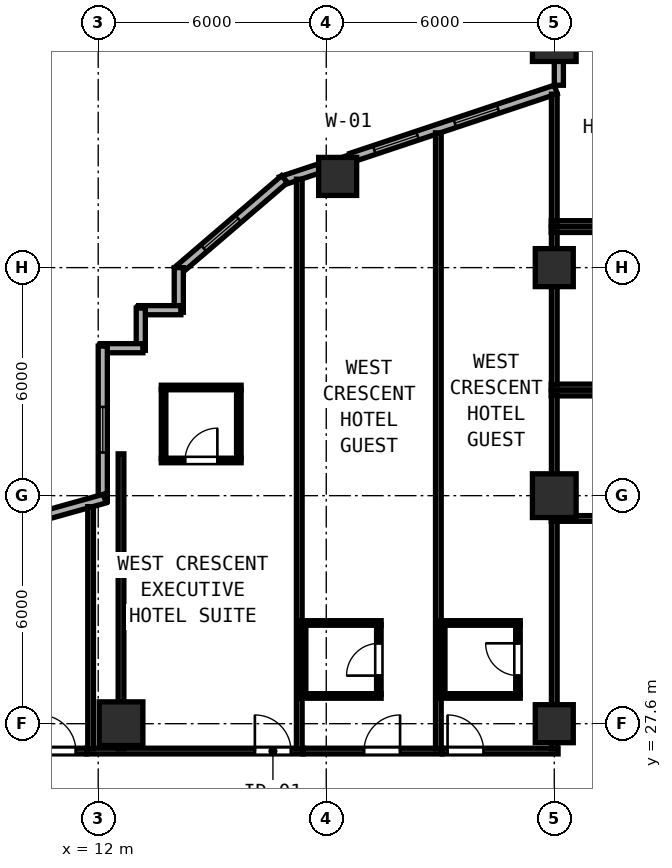
"""IFC4 building model, lengths in metres.
Left out: names, types, materials, properties, quantities, classifications, styles, units other than length and angle.
Written with IfcOpenShell. Run it as: python <this file> out.ifc"""

import sys

from ifc_helpers import new_model, si_unit, direction, frame, frame_2d, origin, origin_2d, place, context, subcontext, project, spatial, rectangle, hollow_rectangle, extrude, element, fill, save


model = new_model("IFC4")
c1 = context("Model", 3, precision=1e-05, world=origin(), true_north=direction((0.0, 1.0)))
c2 = subcontext(c1, "Body", "Model", "MODEL_VIEW")
j1 = project(units=[si_unit("LENGTHUNIT", "METRE"), si_unit("PLANEANGLEUNIT", "RADIAN")], contexts=[c1])
p1 = place(None, origin())
s1 = spatial("IfcSite", under=j1, at=p1, CompositionType="ELEMENT")
p2 = place(p1, origin())
s2 = spatial("IfcBuilding", under=s1, at=p2, CompositionType="ELEMENT")
p3 = place(p2, frame((0.0, 0.0, 70.4)))
s3 = spatial("IfcBuildingStorey", under=s2, at=p3, CompositionType="ELEMENT", Elevation=70.4)
for number, where, z_axis, x_axis in (
    (1, (24.0, 33.6, 0.0), (0.0, 0.0, 1.0), (1.0, 0.0, 0.0)),
    (2, (24.0, 45.6, 0.0), (0.0, 0.0, 1.0), (1.0, 0.0, 0.0)),
    (3, (12.6, 27.6, 0.0), (0.0, 0.0, 1.0), (1.0, 0.0, 0.0)),
):
    element("IfcColumn", number, at=place(p3, frame(where, z_axis=z_axis, x_axis=x_axis)), inside=s3, PredefinedType="COLUMN", context=c2, shape_type="SweptSolid", body=[
        extrude(hollow_rectangle(XDim=1.15, YDim=1.15, WallThickness=0.042, at=origin_2d()), origin(), (0.0, 0.0, 1.0), 3.8),
    ])
for number, where, z_axis, x_axis in (
    (4, (24.0, 27.6, 0.0), (0.0, 0.0, 1.0), (1.0, 0.0, 0.0)),
    (5, (24.0, 39.6, 0.0), (0.0, 0.0, 1.0), (1.0, 0.0, 0.0)),
    (6, (18.3, 42.0, 0.0), (0.0, 0.0, 1.0), (1.0, 0.0, 0.0)),
):
    element("IfcColumn", number, at=place(p3, frame(where, z_axis=z_axis, x_axis=x_axis)), inside=s3, PredefinedType="COLUMN", context=c2, shape_type="SweptSolid", body=[
        extrude(hollow_rectangle(XDim=1.0, YDim=1.0, WallThickness=0.038, at=origin_2d()), origin(), (0.0, 0.0, 1.0), 3.8),
    ])
p4 = place(p3, frame((24.12, 45.033, 0.0), z_axis=(0.0, 0.0, 1.0), x_axis=(0.0, -1.0, 0.0)))
e7 = element("IfcWall", 7, at=p4, inside=s3, PredefinedType="SOLIDWALL", context=c2, shape_type="SweptSolid", body=[
    extrude(rectangle(XDim=0.635, YDim=0.24, at=frame_2d((0.317, 0.0))), origin(), (0.0, 0.0, 1.0), 3.097),
])
p5 = place(p3, frame((24.039, 44.287, 0.0), z_axis=(0.0, 0.0, 1.0), x_axis=(-0.948678995954, -0.316240672014, 0.0)))
e8 = element("IfcWall", 8, at=p5, inside=s3, PredefinedType="SOLIDWALL", context=c2, shape_type="SweptSolid", body=[
    extrude(rectangle(XDim=5.675, YDim=0.24, at=frame_2d((2.837, 0.0))), origin(), (0.0, 0.0, 1.0), 3.097),
])
p6 = place(p5, frame((1.6, 0.0, 0.85)))
e9 = element("IfcOpeningElement", 9, at=p6, cuts=e8, PredefinedType="OPENING", context=c2, shape_type="SweptSolid", body=[
    extrude(rectangle(XDim=1.2, YDim=1.85, at=frame_2d((0.6, 0.925))), frame((0.0, 0.13, 0.0), z_axis=(0.0, -1.0, 0.0), x_axis=(1.0, 0.0, 0.0)), (0.0, 0.0, 1.0), 0.26),
])
p7 = place(p5, frame((3.834, 0.0, 0.85)))
e10 = element("IfcOpeningElement", 10, at=p7, cuts=e8, PredefinedType="OPENING", context=c2, shape_type="SweptSolid", body=[
    extrude(rectangle(XDim=1.2, YDim=1.85, at=frame_2d((0.6, 0.925))), frame((0.0, 0.13, 0.0), z_axis=(0.0, -1.0, 0.0), x_axis=(1.0, 0.0, 0.0)), (0.0, 0.0, 1.0), 0.26),
])
p8 = place(p3, frame((17.808, 42.209, 0.0), z_axis=(0.0, 0.0, 1.0), x_axis=(-0.948706457285, -0.316158279832, 0.0)))
e11 = element("IfcWall", 11, at=p8, inside=s3, PredefinedType="SOLIDWALL", context=c2, shape_type="SweptSolid", body=[
    extrude(rectangle(XDim=1.054, YDim=0.24, at=frame_2d((0.527, 0.0))), origin(), (0.0, 0.0, 1.0), 3.6),
])
p9 = place(p3, frame((16.902, 41.929, 0.0), z_axis=(0.0, 0.0, 1.0), x_axis=(-0.759275136126, -0.650769750112, 0.0)))
e12 = element("IfcWall", 12, at=p9, inside=s3, PredefinedType="SOLIDWALL", context=c2, shape_type="SweptSolid", body=[
    extrude(rectangle(XDim=3.719, YDim=0.24, at=frame_2d((1.86, 0.0))), origin(), (0.0, 0.0, 1.0), 3.6),
])
p10 = place(p9, frame((1.6, 0.0, 0.85)))
e13 = element("IfcOpeningElement", 13, at=p10, cuts=e12, PredefinedType="OPENING", context=c2, shape_type="SweptSolid", body=[
    extrude(rectangle(XDim=1.2, YDim=1.85, at=frame_2d((0.6, 0.925))), frame((0.0, 0.13, 0.0), z_axis=(0.0, -1.0, 0.0), x_axis=(1.0, 0.0, 0.0)), (0.0, 0.0, 1.0), 0.26),
])
p11 = place(p3, frame((14.12, 39.6, 0.0), z_axis=(0.0, 0.0, 1.0), x_axis=(0.0, -1.0, 0.0)))
e14 = element("IfcWall", 14, at=p11, inside=s3, PredefinedType="SOLIDWALL", context=c2, shape_type="SweptSolid", body=[
    extrude(rectangle(XDim=1.175, YDim=0.24, at=frame_2d((0.587, 0.0))), origin(), (0.0, 0.0, 1.0), 3.6),
])
p12 = place(p3, frame((14.175, 38.48, 0.0), z_axis=(0.0, 0.0, 1.0), x_axis=(-1.0, 0.0, 0.0)))
e15 = element("IfcWall", 15, at=p12, inside=s3, PredefinedType="SOLIDWALL", context=c2, shape_type="SweptSolid", body=[
    extrude(rectangle(XDim=1.11, YDim=0.24, at=frame_2d((0.555, 0.0))), origin(), (0.0, 0.0, 1.0), 3.6),
])
p13 = place(p3, frame((13.12, 38.535, 0.0), z_axis=(0.0, 0.0, 1.0), x_axis=(0.0, -1.0, 0.0)))
e16 = element("IfcWall", 16, at=p13, inside=s3, PredefinedType="SOLIDWALL", context=c2, shape_type="SweptSolid", body=[
    extrude(rectangle(XDim=1.11, YDim=0.24, at=frame_2d((0.555, 0.0))), origin(), (0.0, 0.0, 1.0), 3.6),
])
p14 = place(p3, frame((13.175, 37.48, 0.0), z_axis=(0.0, 0.0, 1.0), x_axis=(-1.0, 0.0, 0.0)))
e17 = element("IfcWall", 17, at=p14, inside=s3, PredefinedType="SOLIDWALL", context=c2, shape_type="SweptSolid", body=[
    extrude(rectangle(XDim=1.11, YDim=0.24, at=frame_2d((0.555, 0.0))), origin(), (0.0, 0.0, 1.0), 3.6),
])
p15 = place(p3, frame((12.12, 37.535, 0.0), z_axis=(0.0, 0.0, 1.0), x_axis=(0.0, -1.0, 0.0)))
e18 = element("IfcWall", 18, at=p15, inside=s3, PredefinedType="SOLIDWALL", context=c2, shape_type="SweptSolid", body=[
    extrude(rectangle(XDim=4.081, YDim=0.24, at=frame_2d((2.041, 0.0))), origin(), (0.0, 0.0, 1.0), 3.6),
])
p16 = place(p15, frame((1.6, 0.0, 0.85)))
e19 = element("IfcOpeningElement", 19, at=p16, cuts=e18, PredefinedType="OPENING", context=c2, shape_type="SweptSolid", body=[
    extrude(rectangle(XDim=1.2, YDim=1.85, at=frame_2d((0.6, 0.925))), frame((0.0, 0.13, 0.0), z_axis=(0.0, -1.0, 0.0), x_axis=(1.0, 0.0, 0.0)), (0.0, 0.0, 1.0), 0.26),
])
p17 = place(p3, frame((12.173, 33.524, 0.0), z_axis=(0.0, 0.0, 1.0), x_axis=(-0.963197271032, -0.268795493036, 0.0)))
e20 = element("IfcWall", 20, at=p17, inside=s3, PredefinedType="SOLIDWALL", context=c2, shape_type="SweptSolid", body=[
    extrude(rectangle(XDim=9.095, YDim=0.24, at=frame_2d((4.548, 0.0))), origin(), (0.0, 0.0, 1.0), 3.6),
])
p18 = place(p17, frame((1.6, 0.0, 0.85)))
e21 = element("IfcOpeningElement", 21, at=p18, cuts=e20, PredefinedType="OPENING", context=c2, shape_type="SweptSolid", body=[
    extrude(rectangle(XDim=1.2, YDim=1.85, at=frame_2d((0.6, 0.925))), frame((0.0, 0.13, 0.0), z_axis=(0.0, -1.0, 0.0), x_axis=(1.0, 0.0, 0.0)), (0.0, 0.0, 1.0), 0.26),
])
p19 = place(p17, frame((7.0, 0.0, 0.85)))
e22 = element("IfcOpeningElement", 22, at=p19, cuts=e20, PredefinedType="OPENING", context=c2, shape_type="SweptSolid", body=[
    extrude(rectangle(XDim=1.2, YDim=1.85, at=frame_2d((0.6, 0.925))), frame((0.0, 0.13, 0.0), z_axis=(0.0, -1.0, 0.0), x_axis=(1.0, 0.0, 0.0)), (0.0, 0.0, 1.0), 0.26),
])
for number, where, z_axis, x_axis in (
    (23, (23.92, 36.3, 0.0), (0.0, 0.0, 1.0), (1.0, 0.0, 0.0)),
    (24, (23.92, 33.0, 0.0), (0.0, 0.0, 1.0), (1.0, 0.0, 0.0)),
):
    element("IfcWall", number, at=place(p3, frame(where, z_axis=z_axis, x_axis=x_axis)), inside=s3, PredefinedType="PARTITIONING", context=c2, shape_type="SweptSolid", body=[
        extrude(rectangle(XDim=3.8, YDim=0.15, at=frame_2d((1.9, 0.0))), origin(), (0.0, 0.0, 1.0), 3.6),
    ])
p20 = place(p3, frame((24.0, 33.06, 0.0), z_axis=(0.0, 0.0, 1.0), x_axis=(0.0, 1.0, 0.0)))
e25 = element("IfcWall", 25, at=p20, inside=s3, PredefinedType="PARTITIONING", context=c2, shape_type="SweptSolid", body=[
    extrude(rectangle(XDim=3.18, YDim=0.15, at=frame_2d((1.59, 0.0))), origin(), (0.0, 0.0, 1.0), 3.097),
])
for number, where, z_axis, x_axis in (
    (26, (23.92, 40.6, 0.0), (0.0, 0.0, 1.0), (1.0, 0.0, 0.0)),
    (27, (23.92, 36.46, 0.0), (0.0, 0.0, 1.0), (1.0, 0.0, 0.0)),
):
    element("IfcWall", number, at=place(p3, frame(where, z_axis=z_axis, x_axis=x_axis)), inside=s3, PredefinedType="PARTITIONING", context=c2, shape_type="SweptSolid", body=[
        extrude(rectangle(XDim=3.8, YDim=0.15, at=frame_2d((1.9, 0.0))), origin(), (0.0, 0.0, 1.0), 3.6),
    ])
p21 = place(p3, frame((24.0, 36.52, 0.0), z_axis=(0.0, 0.0, 1.0), x_axis=(0.0, 1.0, 0.0)))
e28 = element("IfcWall", 28, at=p21, inside=s3, PredefinedType="PARTITIONING", context=c2, shape_type="SweptSolid", body=[
    extrude(rectangle(XDim=4.02, YDim=0.15, at=frame_2d((2.01, 0.0))), origin(), (0.0, 0.0, 1.0), 3.097),
])
p22 = place(p3, frame((23.92, 40.76, 0.0), z_axis=(0.0, 0.0, 1.0), x_axis=(1.0, 0.0, 0.0)))
e29 = element("IfcWall", 29, at=p22, inside=s3, PredefinedType="PARTITIONING", context=c2, shape_type="SweptSolid", body=[
    extrude(rectangle(XDim=3.8, YDim=0.15, at=frame_2d((1.9, 0.0))), origin(), (0.0, 0.0, 1.0), 3.6),
])
p23 = place(p3, frame((24.0, 40.82, 0.0), z_axis=(0.0, 0.0, 1.0), x_axis=(0.0, 1.0, 0.0)))
e30 = element("IfcWall", 30, at=p23, inside=s3, PredefinedType="PARTITIONING", context=c2, shape_type="SweptSolid", body=[
    extrude(rectangle(XDim=3.343, YDim=0.15, at=frame_2d((1.671, 0.0))), origin(), (0.0, 0.0, 1.0), 3.097),
])
p24 = place(p3, frame((11.7, 26.88, 0.0), z_axis=(0.0, 0.0, 1.0), x_axis=(1.0, 0.0, 0.0)))
e31 = element("IfcWall", 31, at=p24, inside=s3, PredefinedType="PARTITIONING", context=c2, shape_type="SweptSolid", body=[
    extrude(rectangle(XDim=5.69, YDim=0.15, at=frame_2d((2.845, 0.0))), origin(), (0.0, 0.0, 1.0), 3.6),
])
p25 = place(p24, frame((4.422, 0.0, 0.0)))
e32 = element("IfcOpeningElement", 32, at=p25, cuts=e31, PredefinedType="OPENING", context=c2, shape_type="SweptSolid", body=[
    extrude(rectangle(XDim=0.95, YDim=2.18, at=frame_2d((0.475, 1.09))), frame((0.0, 0.085, 0.0), z_axis=(0.0, -1.0, 0.0), x_axis=(1.0, 0.0, 0.0)), (0.0, 0.0, 1.0), 0.17),
])
p26 = place(p3, frame((11.8, 26.94, 0.0), z_axis=(0.0, 0.0, 1.0), x_axis=(0.0, 1.0, 0.0)))
e33 = element("IfcWall", 33, at=p26, inside=s3, PredefinedType="PARTITIONING", context=c2, shape_type="SweptSolid", body=[
    extrude(rectangle(XDim=6.371, YDim=0.15, at=frame_2d((3.185, 0.0))), origin(), (0.0, 0.0, 1.0), 3.6),
])
p27 = place(p3, frame((17.29, 26.94, 0.0), z_axis=(0.0, 0.0, 1.0), x_axis=(0.0, 1.0, 0.0)))
e34 = element("IfcWall", 34, at=p27, inside=s3, PredefinedType="PARTITIONING", context=c2, shape_type="SweptSolid", body=[
    extrude(rectangle(XDim=14.986, YDim=0.15, at=frame_2d((7.493, 0.0))), origin(), (0.0, 0.0, 1.0), 3.6),
])
p28 = place(p3, frame((13.66, 36.446, 0.0), z_axis=(0.0, 0.0, 1.0), x_axis=(1.0, 0.0, 0.0)))
e35 = element("IfcWall", 35, at=p28, inside=s3, PredefinedType="PARTITIONING", context=c2, shape_type="SweptSolid", body=[
    extrude(rectangle(XDim=2.1, YDim=0.12, at=frame_2d((1.05, 0.0))), origin(), (0.0, 0.0, 1.0), 3.6),
])
p29 = place(p3, frame((13.66, 34.526, 0.0), z_axis=(0.0, 0.0, 1.0), x_axis=(1.0, 0.0, 0.0)))
e36 = element("IfcWall", 36, at=p29, inside=s3, PredefinedType="PARTITIONING", context=c2, shape_type="SweptSolid", body=[
    extrude(rectangle(XDim=2.1, YDim=0.12, at=frame_2d((1.05, 0.0))), origin(), (0.0, 0.0, 1.0), 3.6),
])
p30 = place(p29, frame((0.625, 0.0, 0.0)))
e37 = element("IfcOpeningElement", 37, at=p30, cuts=e36, PredefinedType="OPENING", context=c2, shape_type="SweptSolid", body=[
    extrude(rectangle(XDim=0.85, YDim=2.1, at=frame_2d((0.425, 1.05))), frame((0.0, 0.07, 0.0), z_axis=(0.0, -1.0, 0.0), x_axis=(1.0, 0.0, 0.0)), (0.0, 0.0, 1.0), 0.14),
])
for number, where, z_axis, x_axis in (
    (38, (13.72, 34.571, 0.0), (0.0, 0.0, 1.0), (0.0, 1.0, 0.0)),
    (39, (15.7, 34.571, 0.0), (0.0, 0.0, 1.0), (0.0, 1.0, 0.0)),
):
    element("IfcWall", number, at=place(p3, frame(where, z_axis=z_axis, x_axis=x_axis)), inside=s3, PredefinedType="PARTITIONING", context=c2, shape_type="SweptSolid", body=[
        extrude(rectangle(XDim=1.83, YDim=0.12, at=frame_2d((0.915, 0.0))), origin(), (0.0, 0.0, 1.0), 3.6),
    ])
p31 = place(p3, frame((17.392, 26.88, 0.0), z_axis=(0.0, 0.0, 1.0), x_axis=(1.0, 0.0, 0.0)))
e40 = element("IfcWall", 40, at=p31, inside=s3, PredefinedType="PARTITIONING", context=c2, shape_type="SweptSolid", body=[
    extrude(rectangle(XDim=3.658, YDim=0.15, at=frame_2d((1.829, 0.0))), origin(), (0.0, 0.0, 1.0), 3.6),
])
p32 = place(p31, frame((1.601, 0.0, 0.0)))
e41 = element("IfcOpeningElement", 41, at=p32, cuts=e40, PredefinedType="OPENING", context=c2, shape_type="SweptSolid", body=[
    extrude(rectangle(XDim=0.95, YDim=2.15, at=frame_2d((0.475, 1.075))), frame((0.0, 0.085, 0.0), z_axis=(0.0, -1.0, 0.0), x_axis=(1.0, 0.0, 0.0)), (0.0, 0.0, 1.0), 0.17),
])
p33 = place(p3, frame((20.95, 26.94, 0.0), z_axis=(0.0, 0.0, 1.0), x_axis=(0.0, 1.0, 0.0)))
e42 = element("IfcWall", 42, at=p33, inside=s3, PredefinedType="PARTITIONING", context=c2, shape_type="SweptSolid", body=[
    extrude(rectangle(XDim=16.206, YDim=0.15, at=frame_2d((8.103, 0.0))), origin(), (0.0, 0.0, 1.0), 3.6),
])
for number, where, z_axis, x_axis in (
    (43, (17.35, 30.25, 0.0), (0.0, 0.0, 1.0), (1.0, 0.0, 0.0)),
    (44, (17.35, 28.33, 0.0), (0.0, 0.0, 1.0), (1.0, 0.0, 0.0)),
):
    element("IfcWall", number, at=place(p3, frame(where, z_axis=z_axis, x_axis=x_axis)), inside=s3, PredefinedType="PARTITIONING", context=c2, shape_type="SweptSolid", body=[
        extrude(rectangle(XDim=2.094, YDim=0.12, at=frame_2d((1.047, 0.0))), origin(), (0.0, 0.0, 1.0), 3.6),
    ])
p34 = place(p3, frame((17.404, 28.375, 0.0), z_axis=(0.0, 0.0, 1.0), x_axis=(0.0, 1.0, 0.0)))
e45 = element("IfcWall", 45, at=p34, inside=s3, PredefinedType="PARTITIONING", context=c2, shape_type="SweptSolid", body=[
    extrude(rectangle(XDim=1.83, YDim=0.12, at=frame_2d((0.915, 0.0))), origin(), (0.0, 0.0, 1.0), 3.6),
])
p35 = place(p3, frame((19.384, 28.375, 0.0), z_axis=(0.0, 0.0, 1.0), x_axis=(0.0, 1.0, 0.0)))
e46 = element("IfcWall", 46, at=p35, inside=s3, PredefinedType="PARTITIONING", context=c2, shape_type="SweptSolid", body=[
    extrude(rectangle(XDim=1.83, YDim=0.12, at=frame_2d((0.915, 0.0))), origin(), (0.0, 0.0, 1.0), 3.6),
])
p36 = place(p35, frame((0.49, 0.0, 0.0)))
e47 = element("IfcOpeningElement", 47, at=p36, cuts=e46, PredefinedType="OPENING", context=c2, shape_type="SweptSolid", body=[
    extrude(rectangle(XDim=0.85, YDim=2.1, at=frame_2d((0.425, 1.05))), frame((0.0, 0.07, 0.0), z_axis=(0.0, -1.0, 0.0), x_axis=(1.0, 0.0, 0.0)), (0.0, 0.0, 1.0), 0.14),
])
p37 = place(p3, frame((21.052, 26.88, 0.0), z_axis=(0.0, 0.0, 1.0), x_axis=(1.0, 0.0, 0.0)))
e48 = element("IfcWall", 48, at=p37, inside=s3, PredefinedType="PARTITIONING", context=c2, shape_type="SweptSolid", body=[
    extrude(rectangle(XDim=3.048, YDim=0.15, at=frame_2d((1.524, 0.0))), origin(), (0.0, 0.0, 1.0), 3.6),
])
p38 = place(p37, frame((0.14, 0.0, 0.0)))
e49 = element("IfcOpeningElement", 49, at=p38, cuts=e48, PredefinedType="OPENING", context=c2, shape_type="SweptSolid", body=[
    extrude(rectangle(XDim=0.95, YDim=2.15, at=frame_2d((0.475, 1.075))), frame((0.0, 0.085, 0.0), z_axis=(0.0, -1.0, 0.0), x_axis=(1.0, 0.0, 0.0)), (0.0, 0.0, 1.0), 0.17),
])
p39 = place(p3, frame((24.0, 26.94, 0.0), z_axis=(0.0, 0.0, 1.0), x_axis=(0.0, 1.0, 0.0)))
e50 = element("IfcWall", 50, at=p39, inside=s3, PredefinedType="PARTITIONING", context=c2, shape_type="SweptSolid", body=[
    extrude(rectangle(XDim=6.0, YDim=0.15, at=frame_2d((3.0, 0.0))), origin(), (0.0, 0.0, 1.0), 3.097),
])
for number, where, z_axis, x_axis in (
    (51, (21.01, 30.25, 0.0), (0.0, 0.0, 1.0), (1.0, 0.0, 0.0)),
    (52, (21.01, 28.33, 0.0), (0.0, 0.0, 1.0), (1.0, 0.0, 0.0)),
):
    element("IfcWall", number, at=place(p3, frame(where, z_axis=z_axis, x_axis=x_axis)), inside=s3, PredefinedType="PARTITIONING", context=c2, shape_type="SweptSolid", body=[
        extrude(rectangle(XDim=2.094, YDim=0.12, at=frame_2d((1.047, 0.0))), origin(), (0.0, 0.0, 1.0), 3.6),
    ])
p40 = place(p3, frame((21.064, 28.375, 0.0), z_axis=(0.0, 0.0, 1.0), x_axis=(0.0, 1.0, 0.0)))
e53 = element("IfcWall", 53, at=p40, inside=s3, PredefinedType="PARTITIONING", context=c2, shape_type="SweptSolid", body=[
    extrude(rectangle(XDim=1.83, YDim=0.12, at=frame_2d((0.915, 0.0))), origin(), (0.0, 0.0, 1.0), 3.6),
])
p41 = place(p3, frame((23.044, 28.375, 0.0), z_axis=(0.0, 0.0, 1.0), x_axis=(0.0, 1.0, 0.0)))
e54 = element("IfcWall", 54, at=p41, inside=s3, PredefinedType="PARTITIONING", context=c2, shape_type="SweptSolid", body=[
    extrude(rectangle(XDim=1.83, YDim=0.12, at=frame_2d((0.915, 0.0))), origin(), (0.0, 0.0, 1.0), 3.6),
])
p42 = place(p41, frame((0.49, 0.0, 0.0)))
e55 = element("IfcOpeningElement", 55, at=p42, cuts=e54, PredefinedType="OPENING", context=c2, shape_type="SweptSolid", body=[
    extrude(rectangle(XDim=0.85, YDim=2.1, at=frame_2d((0.425, 1.05))), frame((0.0, 0.07, 0.0), z_axis=(0.0, -1.0, 0.0), x_axis=(1.0, 0.0, 0.0)), (0.0, 0.0, 1.0), 0.14),
])
p43 = place(p3, frame((1.425, 26.88, 0.0), z_axis=(0.0, 0.0, 1.0), x_axis=(1.0, 0.0, 0.0)))
e56 = element("IfcWall", 56, at=p43, inside=s3, PredefinedType="PARTITIONING", context=c2, shape_type="SweptSolid", body=[
    extrude(rectangle(XDim=10.273, YDim=0.15, at=frame_2d((5.136, 0.0))), origin(), (0.0, 0.0, 1.0), 3.6),
])
p44 = place(p43, frame((9.036, 0.0, 0.0)))
e57 = element("IfcOpeningElement", 57, at=p44, cuts=e56, PredefinedType="OPENING", context=c2, shape_type="SweptSolid", body=[
    extrude(rectangle(XDim=0.95, YDim=2.15, at=frame_2d((0.475, 1.075))), frame((0.0, 0.085, 0.0), z_axis=(0.0, -1.0, 0.0), x_axis=(1.0, 0.0, 0.0)), (0.0, 0.0, 1.0), 0.17),
])
p45 = place(p3, frame((12.6, 26.94, 0.0), z_axis=(0.0, 0.0, 1.0), x_axis=(0.0, 1.0, 0.0)))
e58 = element("IfcWall", 58, at=p45, inside=s3, PredefinedType="PARTITIONING", context=c2, shape_type="SweptSolid", body=[
    extrude(rectangle(XDim=7.76, YDim=0.15, at=frame_2d((3.88, 0.0))), origin(), (0.0, 0.0, 1.0), 3.097),
])
p46 = place(p6, origin())
e59 = element("IfcWindow", 59, at=p46, inside=s3, PartitioningType="SINGLE_PANEL", PredefinedType="WINDOW", context=c2, shape_type="SweptSolid", body=[
    extrude(rectangle(XDim=1.2, YDim=1.85, at=frame_2d((0.6, 0.925))), frame((0.0, 0.03, 0.0), z_axis=(0.0, -1.0, 0.0), x_axis=(1.0, 0.0, 0.0)), (0.0, 0.0, 1.0), 0.06),
])
fill(e9, e59)
p47 = place(p10, origin())
e60 = element("IfcWindow", 60, at=p47, inside=s3, PartitioningType="SINGLE_PANEL", PredefinedType="WINDOW", context=c2, shape_type="SweptSolid", body=[
    extrude(rectangle(XDim=1.2, YDim=1.85, at=frame_2d((0.6, 0.925))), frame((0.0, 0.03, 0.0), z_axis=(0.0, -1.0, 0.0), x_axis=(1.0, 0.0, 0.0)), (0.0, 0.0, 1.0), 0.06),
])
fill(e13, e60)
p48 = place(p16, origin())
e61 = element("IfcWindow", 61, at=p48, inside=s3, PartitioningType="SINGLE_PANEL", PredefinedType="WINDOW", context=c2, shape_type="SweptSolid", body=[
    extrude(rectangle(XDim=1.2, YDim=1.85, at=frame_2d((0.6, 0.925))), frame((0.0, 0.03, 0.0), z_axis=(0.0, -1.0, 0.0), x_axis=(1.0, 0.0, 0.0)), (0.0, 0.0, 1.0), 0.06),
])
fill(e19, e61)
p49 = place(p25, origin())
e62 = element("IfcDoor", 62, at=p49, inside=s3, OperationType="SINGLE_SWING_LEFT", PredefinedType="DOOR", context=c2, shape_type="SweptSolid", body=[
    extrude(rectangle(XDim=0.95, YDim=2.18, at=frame_2d((0.475, 1.09))), frame((0.0, 0.025, 0.0), z_axis=(0.0, -1.0, 0.0), x_axis=(1.0, 0.0, 0.0)), (0.0, 0.0, 1.0), 0.05),
])
fill(e32, e62)
p50 = place(p30, origin())
e63 = element("IfcDoor", 63, at=p50, inside=s3, OperationType="SINGLE_SWING_RIGHT", PredefinedType="DOOR", context=c2, shape_type="SweptSolid", body=[
    extrude(rectangle(XDim=0.85, YDim=2.1, at=frame_2d((0.425, 1.05))), frame((0.0, 0.025, 0.0), z_axis=(0.0, -1.0, 0.0), x_axis=(1.0, 0.0, 0.0)), (0.0, 0.0, 1.0), 0.05),
])
fill(e37, e63)
p51 = place(p32, origin())
e64 = element("IfcDoor", 64, at=p51, inside=s3, OperationType="SINGLE_SWING_RIGHT", PredefinedType="DOOR", context=c2, shape_type="SweptSolid", body=[
    extrude(rectangle(XDim=0.95, YDim=2.15, at=frame_2d((0.475, 1.075))), frame((0.0, 0.025, 0.0), z_axis=(0.0, -1.0, 0.0), x_axis=(1.0, 0.0, 0.0)), (0.0, 0.0, 1.0), 0.05),
])
fill(e41, e64)
p52 = place(p36, origin())
e65 = element("IfcDoor", 65, at=p52, inside=s3, OperationType="SINGLE_SWING_LEFT", PredefinedType="DOOR", context=c2, shape_type="SweptSolid", body=[
    extrude(rectangle(XDim=0.85, YDim=2.1, at=frame_2d((0.425, 1.05))), frame((0.0, 0.025, 0.0), z_axis=(0.0, -1.0, 0.0), x_axis=(1.0, 0.0, 0.0)), (0.0, 0.0, 1.0), 0.05),
])
fill(e47, e65)
p53 = place(p38, origin())
e66 = element("IfcDoor", 66, at=p53, inside=s3, OperationType="SINGLE_SWING_LEFT", PredefinedType="DOOR", context=c2, shape_type="SweptSolid", body=[
    extrude(rectangle(XDim=0.95, YDim=2.15, at=frame_2d((0.475, 1.075))), frame((0.0, 0.025, 0.0), z_axis=(0.0, -1.0, 0.0), x_axis=(1.0, 0.0, 0.0)), (0.0, 0.0, 1.0), 0.05),
])
fill(e49, e66)
p54 = place(p42, origin())
e67 = element("IfcDoor", 67, at=p54, inside=s3, OperationType="SINGLE_SWING_RIGHT", PredefinedType="DOOR", context=c2, shape_type="SweptSolid", body=[
    extrude(rectangle(XDim=0.85, YDim=2.1, at=frame_2d((0.425, 1.05))), frame((0.0, 0.025, 0.0), z_axis=(0.0, -1.0, 0.0), x_axis=(1.0, 0.0, 0.0)), (0.0, 0.0, 1.0), 0.05),
])
fill(e55, e67)
p55 = place(p44, origin())
e68 = element("IfcDoor", 68, at=p55, inside=s3, OperationType="SINGLE_SWING_LEFT", PredefinedType="DOOR", context=c2, shape_type="SweptSolid", body=[
    extrude(rectangle(XDim=0.95, YDim=2.15, at=frame_2d((0.475, 1.075))), frame((0.0, 0.025, 0.0), z_axis=(0.0, -1.0, 0.0), x_axis=(1.0, 0.0, 0.0)), (0.0, 0.0, 1.0), 0.05),
])
fill(e57, e68)
p56 = place(p7, origin())
e69 = element("IfcWindow", 69, at=p56, inside=s3, PartitioningType="SINGLE_PANEL", PredefinedType="WINDOW", context=c2, shape_type="SweptSolid", body=[
    extrude(rectangle(XDim=1.2, YDim=1.85, at=frame_2d((0.6, 0.925))), frame((0.0, 0.03, 0.0), z_axis=(0.0, -1.0, 0.0), x_axis=(1.0, 0.0, 0.0)), (0.0, 0.0, 1.0), 0.06),
])
fill(e10, e69)
save(model, sys.argv[1])
